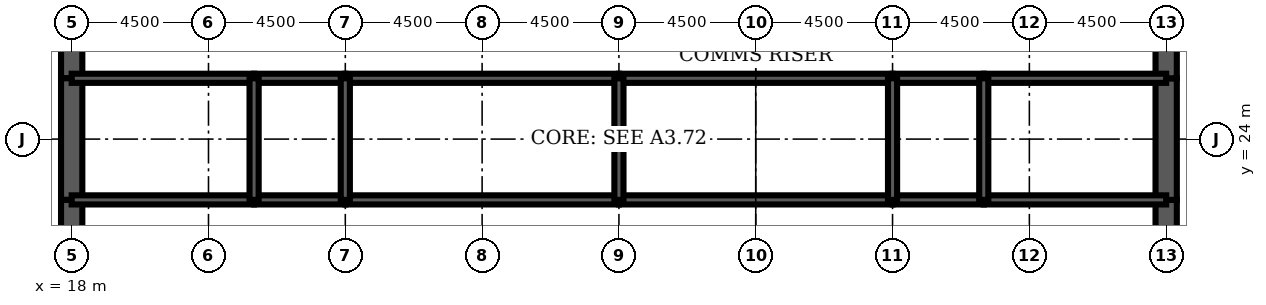
"""IFC4 building model, lengths in metres.
Left out: names, types, materials, properties, quantities, classifications, styles, units other than length and angle.
Written with IfcOpenShell. Run it as: python <this file> out.ifc"""

import sys

from ifc_helpers import new_model, si_unit, direction, frame, frame_2d, origin, place, context, subcontext, project, spatial, rectangle, extrude, element, fill, save


model = new_model("IFC4")
c1 = context("Model", 3, precision=1e-05, world=origin(), true_north=direction((0.0, 1.0)))
c2 = subcontext(c1, "Body", "Model", "MODEL_VIEW")
j1 = project(units=[si_unit("LENGTHUNIT", "METRE"), si_unit("PLANEANGLEUNIT", "RADIAN")], contexts=[c1])
p1 = place(None, origin())
s1 = spatial("IfcSite", under=j1, at=p1, CompositionType="ELEMENT")
p2 = place(p1, origin())
s2 = spatial("IfcBuilding", under=s1, at=p2, CompositionType="ELEMENT")
p3 = place(p2, frame((0.0, 0.0, 308.9)))
s3 = spatial("IfcBuildingStorey", under=s2, at=p3, CompositionType="ELEMENT", Elevation=308.9)
p4 = place(p3, frame((18.0, 28.8, 0.0), z_axis=(0.0, 0.0, 1.0), x_axis=(0.0, -1.0, 0.0)))
e1 = element("IfcWall", 1, at=p4, inside=s3, PredefinedType="SHEAR", context=c2, shape_type="SweptSolid", body=[
    extrude(rectangle(XDim=2.8, YDim=0.7, at=frame_2d((1.4, 0.0))), origin(), (0.0, 0.0, 1.0), 4.2),
])
p5 = place(p4, frame((0.4, 0.0, 0.0)))
e2 = element("IfcOpeningElement", 2, at=p5, cuts=e1, PredefinedType="OPENING", context=c2, shape_type="SweptSolid", body=[
    extrude(rectangle(XDim=1.8, YDim=2.1, at=frame_2d((0.9, 1.05))), frame((0.0, 0.36, 0.0), z_axis=(0.0, -1.0, 0.0), x_axis=(1.0, 0.0, 0.0)), (0.0, 0.0, 1.0), 0.72),
])
p6 = place(p3, frame((18.0, 26.0, 0.0), z_axis=(0.0, 0.0, 1.0), x_axis=(0.0, -1.0, 0.0)))
e3 = element("IfcWall", 3, at=p6, inside=s3, PredefinedType="SHEAR", context=c2, shape_type="SweptSolid", body=[
    extrude(rectangle(XDim=4.0, YDim=0.7, at=frame_2d((2.0, 0.0))), origin(), (0.0, 0.0, 1.0), 4.2),
])
p7 = place(p3, frame((18.0, 22.0, 0.0), z_axis=(0.0, 0.0, 1.0), x_axis=(0.0, -1.0, 0.0)))
e4 = element("IfcWall", 4, at=p7, inside=s3, PredefinedType="SHEAR", context=c2, shape_type="SweptSolid", body=[
    extrude(rectangle(XDim=2.8, YDim=0.7, at=frame_2d((1.4, 0.0))), origin(), (0.0, 0.0, 1.0), 4.2),
])
p8 = place(p7, frame((0.6, 0.0, 0.0)))
e5 = element("IfcOpeningElement", 5, at=p8, cuts=e4, PredefinedType="OPENING", context=c2, shape_type="SweptSolid", body=[
    extrude(rectangle(XDim=1.8, YDim=2.1, at=frame_2d((0.9, 1.05))), frame((0.0, 0.36, 0.0), z_axis=(0.0, -1.0, 0.0), x_axis=(1.0, 0.0, 0.0)), (0.0, 0.0, 1.0), 0.72),
])
p9 = place(p3, frame((54.0, 19.2, 0.0), z_axis=(0.0, 0.0, 1.0), x_axis=(0.0, 1.0, 0.0)))
e6 = element("IfcWall", 6, at=p9, inside=s3, PredefinedType="SHEAR", context=c2, shape_type="SweptSolid", body=[
    extrude(rectangle(XDim=2.8, YDim=0.7, at=frame_2d((1.4, 0.0))), origin(), (0.0, 0.0, 1.0), 4.2),
])
p10 = place(p9, frame((0.4, 0.0, 0.0)))
e7 = element("IfcOpeningElement", 7, at=p10, cuts=e6, PredefinedType="OPENING", context=c2, shape_type="SweptSolid", body=[
    extrude(rectangle(XDim=1.8, YDim=2.1, at=frame_2d((0.9, 1.05))), frame((0.0, 0.36, 0.0), z_axis=(0.0, -1.0, 0.0), x_axis=(1.0, 0.0, 0.0)), (0.0, 0.0, 1.0), 0.72),
])
p11 = place(p3, frame((54.0, 22.0, 0.0), z_axis=(0.0, 0.0, 1.0), x_axis=(0.0, 1.0, 0.0)))
e8 = element("IfcWall", 8, at=p11, inside=s3, PredefinedType="SHEAR", context=c2, shape_type="SweptSolid", body=[
    extrude(rectangle(XDim=4.0, YDim=0.7, at=frame_2d((2.0, 0.0))), origin(), (0.0, 0.0, 1.0), 4.2),
])
p12 = place(p3, frame((54.0, 26.0, 0.0), z_axis=(0.0, 0.0, 1.0), x_axis=(0.0, 1.0, 0.0)))
e9 = element("IfcWall", 9, at=p12, inside=s3, PredefinedType="SHEAR", context=c2, shape_type="SweptSolid", body=[
    extrude(rectangle(XDim=2.8, YDim=0.7, at=frame_2d((1.4, 0.0))), origin(), (0.0, 0.0, 1.0), 4.2),
])
p13 = place(p12, frame((0.6, 0.0, 0.0)))
e10 = element("IfcOpeningElement", 10, at=p13, cuts=e9, PredefinedType="OPENING", context=c2, shape_type="SweptSolid", body=[
    extrude(rectangle(XDim=1.8, YDim=2.1, at=frame_2d((0.9, 1.05))), frame((0.0, 0.36, 0.0), z_axis=(0.0, -1.0, 0.0), x_axis=(1.0, 0.0, 0.0)), (0.0, 0.0, 1.0), 0.72),
])
p14 = place(p3, frame((18.0, 22.0, 0.0), z_axis=(0.0, 0.0, 1.0), x_axis=(1.0, 0.0, 0.0)))
e11 = element("IfcWall", 11, at=p14, inside=s3, PredefinedType="SOLIDWALL", context=c2, shape_type="SweptSolid", body=[
    extrude(rectangle(XDim=6.0, YDim=0.3, at=frame_2d((3.0, 0.0))), origin(), (0.0, 0.0, 1.0), 4.2),
])
p15 = place(p14, frame((4.4, 0.0, 0.0)))
e12 = element("IfcOpeningElement", 12, at=p15, cuts=e11, PredefinedType="OPENING", context=c2, shape_type="SweptSolid", body=[
    extrude(rectangle(XDim=1.0, YDim=2.1, at=frame_2d((0.5, 1.05))), frame((0.0, 0.16, 0.0), z_axis=(0.0, -1.0, 0.0), x_axis=(1.0, 0.0, 0.0)), (0.0, 0.0, 1.0), 0.32),
])
p16 = place(p14, frame((0.6, 0.0, 0.0)))
e13 = element("IfcOpeningElement", 13, at=p16, cuts=e11, PredefinedType="OPENING", context=c2, shape_type="SweptSolid", body=[
    extrude(rectangle(XDim=1.0, YDim=2.1, at=frame_2d((0.5, 1.05))), frame((0.0, 0.16, 0.0), z_axis=(0.0, -1.0, 0.0), x_axis=(1.0, 0.0, 0.0)), (0.0, 0.0, 1.0), 0.32),
])
p17 = place(p3, frame((24.0, 22.0, 0.0), z_axis=(0.0, 0.0, 1.0), x_axis=(1.0, 0.0, 0.0)))
e14 = element("IfcWall", 14, at=p17, inside=s3, PredefinedType="SOLIDWALL", context=c2, shape_type="SweptSolid", body=[
    extrude(rectangle(XDim=3.0, YDim=0.3, at=frame_2d((1.5, 0.0))), origin(), (0.0, 0.0, 1.0), 4.2),
])
p18 = place(p17, frame((1.0, 0.0, 0.0)))
e15 = element("IfcOpeningElement", 15, at=p18, cuts=e14, PredefinedType="OPENING", context=c2, shape_type="SweptSolid", body=[
    extrude(rectangle(XDim=1.0, YDim=2.1, at=frame_2d((0.5, 1.05))), frame((0.0, 0.16, 0.0), z_axis=(0.0, -1.0, 0.0), x_axis=(1.0, 0.0, 0.0)), (0.0, 0.0, 1.0), 0.32),
])
p19 = place(p3, frame((27.0, 22.0, 0.0), z_axis=(0.0, 0.0, 1.0), x_axis=(1.0, 0.0, 0.0)))
e16 = element("IfcWall", 16, at=p19, inside=s3, PredefinedType="SOLIDWALL", context=c2, shape_type="SweptSolid", body=[
    extrude(rectangle(XDim=9.0, YDim=0.3, at=frame_2d((4.5, 0.0))), origin(), (0.0, 0.0, 1.0), 4.2),
])
p20 = place(p19, frame((4.0, 0.0, 0.0)))
e17 = element("IfcOpeningElement", 17, at=p20, cuts=e16, PredefinedType="OPENING", context=c2, shape_type="SweptSolid", body=[
    extrude(rectangle(XDim=1.0, YDim=2.1, at=frame_2d((0.5, 1.05))), frame((0.0, 0.16, 0.0), z_axis=(0.0, -1.0, 0.0), x_axis=(1.0, 0.0, 0.0)), (0.0, 0.0, 1.0), 0.32),
])
p21 = place(p3, frame((36.0, 22.0, 0.0), z_axis=(0.0, 0.0, 1.0), x_axis=(1.0, 0.0, 0.0)))
e18 = element("IfcWall", 18, at=p21, inside=s3, PredefinedType="SOLIDWALL", context=c2, shape_type="SweptSolid", body=[
    extrude(rectangle(XDim=9.0, YDim=0.3, at=frame_2d((4.5, 0.0))), origin(), (0.0, 0.0, 1.0), 4.2),
])
p22 = place(p21, frame((4.0, 0.0, 0.0)))
e19 = element("IfcOpeningElement", 19, at=p22, cuts=e18, PredefinedType="OPENING", context=c2, shape_type="SweptSolid", body=[
    extrude(rectangle(XDim=1.0, YDim=2.1, at=frame_2d((0.5, 1.05))), frame((0.0, 0.16, 0.0), z_axis=(0.0, -1.0, 0.0), x_axis=(1.0, 0.0, 0.0)), (0.0, 0.0, 1.0), 0.32),
])
p23 = place(p3, frame((45.0, 22.0, 0.0), z_axis=(0.0, 0.0, 1.0), x_axis=(1.0, 0.0, 0.0)))
e20 = element("IfcWall", 20, at=p23, inside=s3, PredefinedType="SOLIDWALL", context=c2, shape_type="SweptSolid", body=[
    extrude(rectangle(XDim=3.0, YDim=0.3, at=frame_2d((1.5, 0.0))), origin(), (0.0, 0.0, 1.0), 4.2),
])
p24 = place(p23, frame((1.0, 0.0, 0.0)))
e21 = element("IfcOpeningElement", 21, at=p24, cuts=e20, PredefinedType="OPENING", context=c2, shape_type="SweptSolid", body=[
    extrude(rectangle(XDim=1.0, YDim=2.1, at=frame_2d((0.5, 1.05))), frame((0.0, 0.16, 0.0), z_axis=(0.0, -1.0, 0.0), x_axis=(1.0, 0.0, 0.0)), (0.0, 0.0, 1.0), 0.32),
])
p25 = place(p3, frame((48.0, 22.0, 0.0), z_axis=(0.0, 0.0, 1.0), x_axis=(1.0, 0.0, 0.0)))
e22 = element("IfcWall", 22, at=p25, inside=s3, PredefinedType="SOLIDWALL", context=c2, shape_type="SweptSolid", body=[
    extrude(rectangle(XDim=6.0, YDim=0.3, at=frame_2d((3.0, 0.0))), origin(), (0.0, 0.0, 1.0), 4.2),
])
p26 = place(p25, frame((2.0, 0.0, 0.0)))
e23 = element("IfcOpeningElement", 23, at=p26, cuts=e22, PredefinedType="OPENING", context=c2, shape_type="SweptSolid", body=[
    extrude(rectangle(XDim=1.0, YDim=2.1, at=frame_2d((0.5, 1.05))), frame((0.0, 0.16, 0.0), z_axis=(0.0, -1.0, 0.0), x_axis=(1.0, 0.0, 0.0)), (0.0, 0.0, 1.0), 0.32),
])
p27 = place(p3, frame((18.0, 26.0, 0.0), z_axis=(0.0, 0.0, 1.0), x_axis=(1.0, 0.0, 0.0)))
e24 = element("IfcWall", 24, at=p27, inside=s3, PredefinedType="SOLIDWALL", context=c2, shape_type="SweptSolid", body=[
    extrude(rectangle(XDim=6.0, YDim=0.3, at=frame_2d((3.0, 0.0))), origin(), (0.0, 0.0, 1.0), 4.2),
])
p28 = place(p3, frame((24.0, 26.0, 0.0), z_axis=(0.0, 0.0, 1.0), x_axis=(1.0, 0.0, 0.0)))
e25 = element("IfcWall", 25, at=p28, inside=s3, PredefinedType="SOLIDWALL", context=c2, shape_type="SweptSolid", body=[
    extrude(rectangle(XDim=3.0, YDim=0.3, at=frame_2d((1.5, 0.0))), origin(), (0.0, 0.0, 1.0), 4.2),
])
for number, where, z_axis, x_axis in (
    (26, (27.0, 26.0, 0.0), (0.0, 0.0, 1.0), (1.0, 0.0, 0.0)),
    (27, (36.0, 26.0, 0.0), (0.0, 0.0, 1.0), (1.0, 0.0, 0.0)),
):
    element("IfcWall", number, at=place(p3, frame(where, z_axis=z_axis, x_axis=x_axis)), inside=s3, PredefinedType="SOLIDWALL", context=c2, shape_type="SweptSolid", body=[
        extrude(rectangle(XDim=9.0, YDim=0.3, at=frame_2d((4.5, 0.0))), origin(), (0.0, 0.0, 1.0), 4.2),
    ])
p29 = place(p3, frame((45.0, 26.0, 0.0), z_axis=(0.0, 0.0, 1.0), x_axis=(1.0, 0.0, 0.0)))
e28 = element("IfcWall", 28, at=p29, inside=s3, PredefinedType="SOLIDWALL", context=c2, shape_type="SweptSolid", body=[
    extrude(rectangle(XDim=3.0, YDim=0.3, at=frame_2d((1.5, 0.0))), origin(), (0.0, 0.0, 1.0), 4.2),
])
p30 = place(p3, frame((48.0, 26.0, 0.0), z_axis=(0.0, 0.0, 1.0), x_axis=(1.0, 0.0, 0.0)))
e29 = element("IfcWall", 29, at=p30, inside=s3, PredefinedType="SOLIDWALL", context=c2, shape_type="SweptSolid", body=[
    extrude(rectangle(XDim=6.0, YDim=0.3, at=frame_2d((3.0, 0.0))), origin(), (0.0, 0.0, 1.0), 4.2),
])
for number, where, z_axis, x_axis in (
    (30, (24.0, 22.0, 0.0), (0.0, 0.0, 1.0), (0.0, 1.0, 0.0)),
    (31, (27.0, 22.0, 0.0), (0.0, 0.0, 1.0), (0.0, 1.0, 0.0)),
    (32, (36.0, 22.0, 0.0), (0.0, 0.0, 1.0), (0.0, 1.0, 0.0)),
    (33, (45.0, 22.0, 0.0), (0.0, 0.0, 1.0), (0.0, 1.0, 0.0)),
    (34, (48.0, 22.0, 0.0), (0.0, 0.0, 1.0), (0.0, 1.0, 0.0)),
):
    element("IfcWall", number, at=place(p3, frame(where, z_axis=z_axis, x_axis=x_axis)), inside=s3, PredefinedType="SOLIDWALL", context=c2, shape_type="SweptSolid", body=[
        extrude(rectangle(XDim=4.0, YDim=0.3, at=frame_2d((2.0, 0.0))), origin(), (0.0, 0.0, 1.0), 4.2),
    ])
p31 = place(p3, frame((38.0, 22.15, 0.0), z_axis=(0.0, 0.0, 1.0), x_axis=(0.0, 1.0, 0.0)))
e35 = element("IfcWall", 35, at=p31, inside=s3, PredefinedType="PARTITIONING", context=c2, shape_type="SweptSolid", body=[
    extrude(rectangle(XDim=3.7, YDim=0.15, at=frame_2d((1.85, 0.0))), origin(), (0.0, 0.0, 1.0), 3.0),
])
p32 = place(p31, frame((2.2, 0.0, 0.0)))
e36 = element("IfcOpeningElement", 36, at=p32, cuts=e35, PredefinedType="OPENING", context=c2, shape_type="SweptSolid", body=[
    extrude(rectangle(XDim=1.0, YDim=2.1, at=frame_2d((0.5, 1.05))), frame((0.0, 0.085, 0.0), z_axis=(0.0, -1.0, 0.0), x_axis=(1.0, 0.0, 0.0)), (0.0, 0.0, 1.0), 0.17),
])
p33 = place(p3, frame((19.925, 22.15, 0.0), z_axis=(0.0, 0.0, 1.0), x_axis=(0.0, 1.0, 0.0)))
e37 = element("IfcWall", 37, at=p33, inside=s3, PredefinedType="PARTITIONING", context=c2, shape_type="SweptSolid", body=[
    extrude(rectangle(XDim=3.7, YDim=0.15, at=frame_2d((1.85, 0.0))), origin(), (0.0, 0.0, 1.0), 3.0),
])
p34 = place(p32, origin())
e38 = element("IfcDoor", 38, at=p34, inside=s3, OperationType="SINGLE_SWING_RIGHT", PredefinedType="DOOR", context=c2, shape_type="SweptSolid", body=[
    extrude(rectangle(XDim=1.0, YDim=2.1, at=frame_2d((0.5, 1.05))), frame((0.0, 0.025, 0.0), z_axis=(0.0, -1.0, 0.0), x_axis=(1.0, 0.0, 0.0)), (0.0, 0.0, 1.0), 0.05),
])
fill(e36, e38)
p35 = place(p8, origin())
e39 = element("IfcDoor", 39, at=p35, inside=s3, OperationType="SINGLE_SWING_LEFT", PredefinedType="DOOR", context=c2, shape_type="SweptSolid", body=[
    extrude(rectangle(XDim=1.8, YDim=2.1, at=frame_2d((0.9, 1.05))), frame((0.0, 0.35, 0.0), z_axis=(0.0, -1.0, 0.0), x_axis=(1.0, 0.0, 0.0)), (0.0, 0.0, 1.0), 0.699),
])
fill(e5, e39)
p36 = place(p5, origin())
e40 = element("IfcDoor", 40, at=p36, inside=s3, OperationType="SINGLE_SWING_LEFT", PredefinedType="DOOR", context=c2, shape_type="SweptSolid", body=[
    extrude(rectangle(XDim=1.8, YDim=2.1, at=frame_2d((0.9, 1.05))), frame((0.0, 0.35, 0.0), z_axis=(0.0, -1.0, 0.0), x_axis=(1.0, 0.0, 0.0)), (0.0, 0.0, 1.0), 0.699),
])
fill(e2, e40)
p37 = place(p10, origin())
e41 = element("IfcDoor", 41, at=p37, inside=s3, OperationType="SINGLE_SWING_LEFT", PredefinedType="DOOR", context=c2, shape_type="SweptSolid", body=[
    extrude(rectangle(XDim=1.8, YDim=2.1, at=frame_2d((0.9, 1.05))), frame((0.0, 0.35, 0.0), z_axis=(0.0, -1.0, 0.0), x_axis=(1.0, 0.0, 0.0)), (0.0, 0.0, 1.0), 0.699),
])
fill(e7, e41)
p38 = place(p13, origin())
e42 = element("IfcDoor", 42, at=p38, inside=s3, OperationType="SINGLE_SWING_LEFT", PredefinedType="DOOR", context=c2, shape_type="SweptSolid", body=[
    extrude(rectangle(XDim=1.8, YDim=2.1, at=frame_2d((0.9, 1.05))), frame((0.0, 0.35, 0.0), z_axis=(0.0, -1.0, 0.0), x_axis=(1.0, 0.0, 0.0)), (0.0, 0.0, 1.0), 0.699),
])
fill(e10, e42)
p39 = place(p15, origin())
e43 = element("IfcDoor", 43, at=p39, inside=s3, OperationType="SINGLE_SWING_RIGHT", PredefinedType="DOOR", context=c2, shape_type="SweptSolid", body=[
    extrude(rectangle(XDim=1.0, YDim=2.1, at=frame_2d((0.5, 1.05))), frame((0.0, 0.025, 0.0), z_axis=(0.0, -1.0, 0.0), x_axis=(1.0, 0.0, 0.0)), (0.0, 0.0, 1.0), 0.05),
])
fill(e12, e43)
p40 = place(p18, origin())
e44 = element("IfcDoor", 44, at=p40, inside=s3, OperationType="SINGLE_SWING_LEFT", PredefinedType="DOOR", context=c2, shape_type="SweptSolid", body=[
    extrude(rectangle(XDim=1.0, YDim=2.1, at=frame_2d((0.5, 1.05))), frame((0.0, 0.025, 0.0), z_axis=(0.0, -1.0, 0.0), x_axis=(1.0, 0.0, 0.0)), (0.0, 0.0, 1.0), 0.05),
])
fill(e15, e44)
p41 = place(p20, origin())
e45 = element("IfcDoor", 45, at=p41, inside=s3, OperationType="SINGLE_SWING_LEFT", PredefinedType="DOOR", context=c2, shape_type="SweptSolid", body=[
    extrude(rectangle(XDim=1.0, YDim=2.1, at=frame_2d((0.5, 1.05))), frame((0.0, 0.025, 0.0), z_axis=(0.0, -1.0, 0.0), x_axis=(1.0, 0.0, 0.0)), (0.0, 0.0, 1.0), 0.05),
])
fill(e17, e45)
p42 = place(p22, origin())
e46 = element("IfcDoor", 46, at=p42, inside=s3, OperationType="SINGLE_SWING_LEFT", PredefinedType="DOOR", context=c2, shape_type="SweptSolid", body=[
    extrude(rectangle(XDim=1.0, YDim=2.1, at=frame_2d((0.5, 1.05))), frame((0.0, 0.025, 0.0), z_axis=(0.0, -1.0, 0.0), x_axis=(1.0, 0.0, 0.0)), (0.0, 0.0, 1.0), 0.05),
])
fill(e19, e46)
p43 = place(p24, origin())
e47 = element("IfcDoor", 47, at=p43, inside=s3, OperationType="SINGLE_SWING_LEFT", PredefinedType="DOOR", context=c2, shape_type="SweptSolid", body=[
    extrude(rectangle(XDim=1.0, YDim=2.1, at=frame_2d((0.5, 1.05))), frame((0.0, 0.025, 0.0), z_axis=(0.0, -1.0, 0.0), x_axis=(1.0, 0.0, 0.0)), (0.0, 0.0, 1.0), 0.05),
])
fill(e21, e47)
p44 = place(p26, origin())
e48 = element("IfcDoor", 48, at=p44, inside=s3, OperationType="SINGLE_SWING_LEFT", PredefinedType="DOOR", context=c2, shape_type="SweptSolid", body=[
    extrude(rectangle(XDim=1.0, YDim=2.1, at=frame_2d((0.5, 1.05))), frame((0.0, 0.025, 0.0), z_axis=(0.0, -1.0, 0.0), x_axis=(1.0, 0.0, 0.0)), (0.0, 0.0, 1.0), 0.05),
])
fill(e23, e48)
p45 = place(p16, origin())
e49 = element("IfcDoor", 49, at=p45, inside=s3, OperationType="SINGLE_SWING_LEFT", PredefinedType="DOOR", context=c2, shape_type="SweptSolid", body=[
    extrude(rectangle(XDim=1.0, YDim=2.1, at=frame_2d((0.5, 1.05))), frame((0.0, 0.025, 0.0), z_axis=(0.0, -1.0, 0.0), x_axis=(1.0, 0.0, 0.0)), (0.0, 0.0, 1.0), 0.05),
])
fill(e13, e49)
save(model, sys.argv[1])
